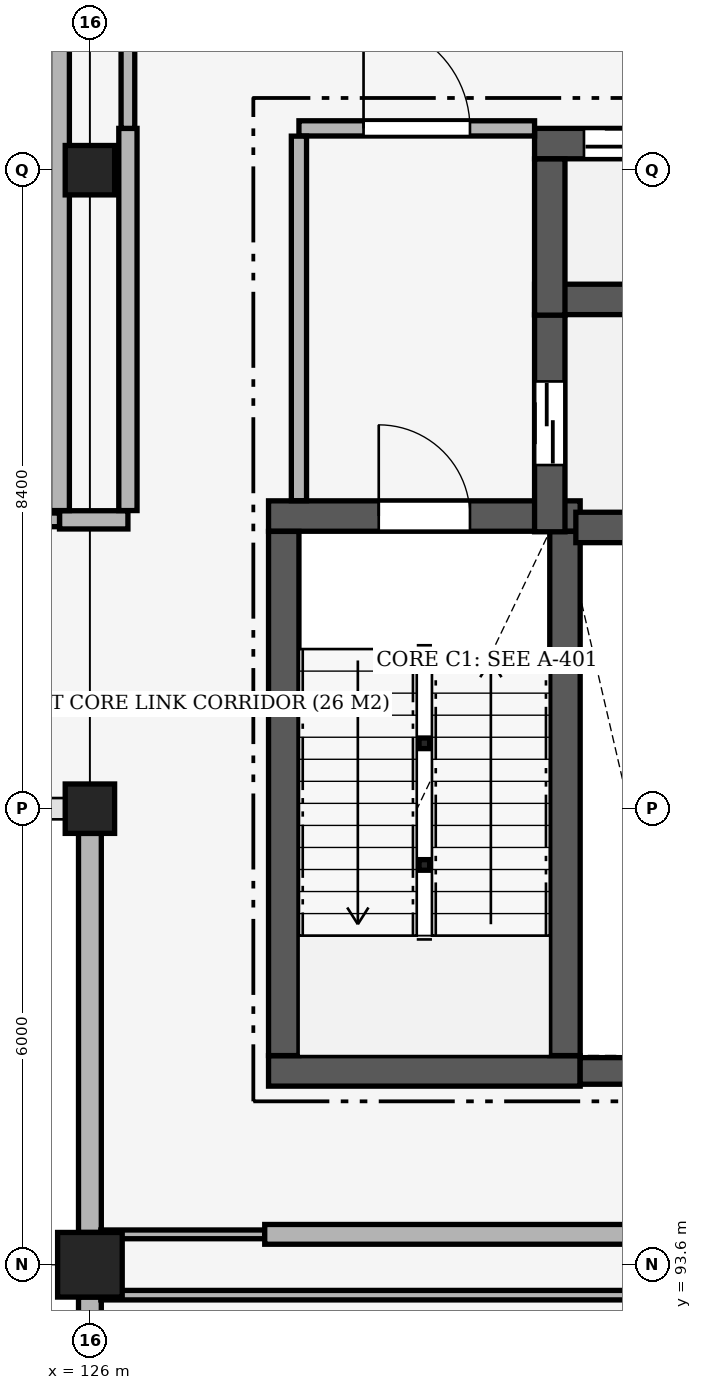
"""IFC4 building model, lengths in metres.
Left out: names, types, materials, properties, quantities, classifications, styles, units other than length and angle.
Written with IfcOpenShell. Run it as: python <this file> out.ifc"""

import sys

from ifc_helpers import new_model, si_unit, direction, frame, frame_2d, origin, origin_2d, place, context, subcontext, project, spatial, rectangle, hollow_circle, extrude, element, fill, save


model = new_model("IFC4")
c1 = context("Model", 3, precision=1e-05, world=origin(), true_north=direction((0.0, 1.0)))
c2 = subcontext(c1, "Body", "Model", "MODEL_VIEW")
j1 = project(units=[si_unit("LENGTHUNIT", "METRE"), si_unit("PLANEANGLEUNIT", "RADIAN")], contexts=[c1])
p1 = place(None, origin())
s1 = spatial("IfcSite", under=j1, at=p1, CompositionType="ELEMENT")
p2 = place(p1, origin())
s2 = spatial("IfcBuilding", under=s1, at=p2, CompositionType="ELEMENT")
p3 = place(p2, origin())
s3 = spatial("IfcBuildingStorey", under=s2, at=p3, CompositionType="ELEMENT", Elevation=0.0)
p4 = place(p3, frame((126.0, 93.6, 0.0), z_axis=(0.0, 0.0, 1.0), x_axis=(1.0, 0.0, 0.0)))
e1 = element("IfcColumn", 1, at=p4, inside=s3, PredefinedType="COLUMN", context=c2, shape_type="SweptSolid", body=[
    extrude(rectangle(XDim=0.85, YDim=0.85, at=origin_2d()), origin(), (0.0, 0.0, 1.0), 5.1),
])
for number, where, z_axis, x_axis in (
    (2, (126.0, 99.6, 0.0), (0.0, 0.0, 1.0), (1.0, 0.0, 0.0)),
    (3, (126.0, 108.0, 0.0), (0.0, 0.0, 1.0), (1.0, 0.0, 0.0)),
):
    element("IfcColumn", number, at=place(p3, frame(where, z_axis=z_axis, x_axis=x_axis)), inside=s3, PredefinedType="COLUMN", context=c2, shape_type="SweptSolid", body=[
        extrude(rectangle(XDim=0.65, YDim=0.65, at=origin_2d()), origin(), (0.0, 0.0, 1.0), 5.1),
    ])
for number, where, z_axis, x_axis in (
    (4, (130.4, 98.86, -2.83), (0.0, 0.0, 1.0), (1.0, 0.0, 0.0)),
    (5, (130.4, 100.46, -2.83), (0.0, 0.0, 1.0), (1.0, 0.0, 0.0)),
):
    element("IfcColumn", number, at=place(p3, frame(where, z_axis=z_axis, x_axis=x_axis)), inside=s3, PredefinedType="COLUMN", context=c2, shape_type="SweptSolid", body=[
        extrude(hollow_circle(Radius=0.07, WallThickness=0.008, at=origin_2d()), origin(), (0.0, 0.0, 1.0), 4.95),
    ])
p5 = place(p3, frame((126.0, 85.625, 0.0), z_axis=(0.0, 0.0, 1.0), x_axis=(0.0, 1.0, 0.0)))
e6 = element("IfcWall", 6, at=p5, inside=s3, PredefinedType="SOLIDWALL", context=c2, shape_type="SweptSolid", body=[
    extrude(rectangle(XDim=7.55, YDim=0.3, at=frame_2d((3.775, 0.0))), origin(), (0.0, 0.0, 1.0), 4.02),
])
p6 = place(p5, frame((1.717, 0.0, 0.85)))
e7 = element("IfcOpeningElement", 7, at=p6, cuts=e6, PredefinedType="OPENING", context=c2, shape_type="SweptSolid", body=[
    extrude(rectangle(XDim=1.2, YDim=2.4, at=frame_2d((0.6, 1.2))), frame((0.0, 0.165, 0.0), z_axis=(0.0, -1.0, 0.0), x_axis=(1.0, 0.0, 0.0)), (0.0, 0.0, 1.0), 0.33),
])
p7 = place(p5, frame((4.633, 0.0, 0.85)))
e8 = element("IfcOpeningElement", 8, at=p7, cuts=e6, PredefinedType="OPENING", context=c2, shape_type="SweptSolid", body=[
    extrude(rectangle(XDim=1.2, YDim=2.4, at=frame_2d((0.6, 1.2))), frame((0.0, 0.165, 0.0), z_axis=(0.0, -1.0, 0.0), x_axis=(1.0, 0.0, 0.0)), (0.0, 0.0, 1.0), 0.33),
])
p8 = place(p3, frame((126.0, 94.025, 0.0), z_axis=(0.0, 0.0, 1.0), x_axis=(0.0, 1.0, 0.0)))
e9 = element("IfcWall", 9, at=p8, inside=s3, PredefinedType="SOLIDWALL", context=c2, shape_type="SweptSolid", body=[
    extrude(rectangle(XDim=5.25, YDim=0.3, at=frame_2d((2.625, 0.0))), origin(), (0.0, 0.0, 1.0), 4.17),
])
p9 = place(p3, frame((128.35, 103.45, 0.0), z_axis=(0.0, 0.0, 1.0), x_axis=(1.0, 0.0, 0.0)))
e10 = element("IfcWall", 10, at=p9, inside=s3, PredefinedType="SHEAR", context=c2, shape_type="SweptSolid", body=[
    extrude(rectangle(XDim=4.1, YDim=0.4, at=frame_2d((2.05, 0.0))), origin(), (0.0, 0.0, 1.0), 4.82),
])
p10 = place(p9, frame((1.45, 0.0, 0.0)))
e11 = element("IfcOpeningElement", 11, at=p10, cuts=e10, PredefinedType="OPENING", context=c2, shape_type="SweptSolid", body=[
    extrude(rectangle(XDim=1.2, YDim=2.2, at=frame_2d((0.6, 1.1))), frame((0.0, 0.215, 0.0), z_axis=(0.0, -1.0, 0.0), x_axis=(1.0, 0.0, 0.0)), (0.0, 0.0, 1.0), 0.43),
])
p11 = place(p3, frame((128.35, 96.15, 0.0), z_axis=(0.0, 0.0, 1.0), x_axis=(1.0, 0.0, 0.0)))
e12 = element("IfcWall", 12, at=p11, inside=s3, PredefinedType="SHEAR", context=c2, shape_type="SweptSolid", body=[
    extrude(rectangle(XDim=4.1, YDim=0.4, at=frame_2d((2.05, 0.0))), origin(), (0.0, 0.0, 1.0), 4.82),
])
for number, where, z_axis, x_axis in (
    (13, (128.55, 96.352, 0.0), (0.0, 0.0, 1.0), (0.0, 1.0, 0.0)),
    (14, (132.25, 96.352, 0.0), (0.0, 0.0, 1.0), (0.0, 1.0, 0.0)),
):
    element("IfcWall", number, at=place(p3, frame(where, z_axis=z_axis, x_axis=x_axis)), inside=s3, PredefinedType="SHEAR", context=c2, shape_type="SweptSolid", body=[
        extrude(rectangle(XDim=6.896, YDim=0.4, at=frame_2d((3.448, 0.0))), origin(), (0.0, 0.0, 1.0), 4.82),
    ])
p12 = place(p3, frame((132.393, 103.3, 0.0), z_axis=(0.0, 0.0, 1.0), x_axis=(1.0, 0.0, 0.0)))
e15 = element("IfcWall", 15, at=p12, inside=s3, PredefinedType="SHEAR", context=c2, shape_type="SweptSolid", body=[
    extrude(rectangle(XDim=1.857, YDim=0.4, at=frame_2d((0.928, 0.0))), origin(), (0.0, 0.0, 1.0), 4.82),
])
p13 = place(p3, frame((131.85, 106.3, 0.0), z_axis=(0.0, 0.0, 1.0), x_axis=(1.0, 0.0, 0.0)))
e16 = element("IfcWall", 16, at=p13, inside=s3, PredefinedType="SHEAR", context=c2, shape_type="SweptSolid", body=[
    extrude(rectangle(XDim=2.4, YDim=0.4, at=frame_2d((1.2, 0.0))), origin(), (0.0, 0.0, 1.0), 4.82),
])
p14 = place(p3, frame((132.05, 103.243, 0.0), z_axis=(0.0, 0.0, 1.0), x_axis=(0.0, 1.0, 0.0)))
e17 = element("IfcWall", 17, at=p14, inside=s3, PredefinedType="SHEAR", context=c2, shape_type="SweptSolid", body=[
    extrude(rectangle(XDim=2.855, YDim=0.4, at=frame_2d((1.427, 0.0))), origin(), (0.0, 0.0, 1.0), 4.82),
])
p15 = place(p14, frame((0.878, 0.0, 0.0)))
e18 = element("IfcOpeningElement", 18, at=p15, cuts=e17, PredefinedType="OPENING", context=c2, shape_type="SweptSolid", body=[
    extrude(rectangle(XDim=1.1, YDim=2.15, at=frame_2d((0.55, 1.075))), frame((0.0, 0.215, 0.0), z_axis=(0.0, -1.0, 0.0), x_axis=(1.0, 0.0, 0.0)), (0.0, 0.0, 1.0), 0.43),
])
p16 = place(p3, frame((131.85, 108.35, 0.0), z_axis=(0.0, 0.0, 1.0), x_axis=(1.0, 0.0, 0.0)))
e19 = element("IfcWall", 19, at=p16, inside=s3, PredefinedType="SHEAR", context=c2, shape_type="SweptSolid", body=[
    extrude(rectangle(XDim=2.4, YDim=0.4, at=frame_2d((1.2, 0.0))), origin(), (0.0, 0.0, 1.0), 4.82),
])
p17 = place(p16, frame((0.65, 0.0, 0.0)))
e20 = element("IfcOpeningElement", 20, at=p17, cuts=e19, PredefinedType="OPENING", context=c2, shape_type="SweptSolid", body=[
    extrude(rectangle(XDim=1.1, YDim=2.15, at=frame_2d((0.55, 1.075))), frame((0.0, 0.215, 0.0), z_axis=(0.0, -1.0, 0.0), x_axis=(1.0, 0.0, 0.0)), (0.0, 0.0, 1.0), 0.43),
])
p18 = place(p3, frame((132.05, 106.093, 0.0), z_axis=(0.0, 0.0, 1.0), x_axis=(0.0, 1.0, 0.0)))
e21 = element("IfcWall", 21, at=p18, inside=s3, PredefinedType="SHEAR", context=c2, shape_type="SweptSolid", body=[
    extrude(rectangle(XDim=2.055, YDim=0.4, at=frame_2d((1.027, 0.0))), origin(), (0.0, 0.0, 1.0), 4.82),
])
p19 = place(p3, frame((132.45, 96.15, 0.0), z_axis=(0.0, 0.0, 1.0), x_axis=(1.0, 0.0, 0.0)))
e22 = element("IfcWall", 22, at=p19, inside=s3, PredefinedType="SHEAR", context=c2, shape_type="SweptSolid", body=[
    extrude(rectangle(XDim=1.8, YDim=0.35, at=frame_2d((0.9, 0.0))), origin(), (0.0, 0.0, 1.0), 4.82),
])
p20 = place(p3, frame((126.144, 93.2, 0.0), z_axis=(0.0, 0.0, 1.0), x_axis=(1.0, 0.0, 0.0)))
e23 = element("IfcWall", 23, at=p20, inside=s3, PredefinedType="PARTITIONING", context=c2, shape_type="SweptSolid", body=[
    extrude(rectangle(XDim=12.656, YDim=0.125, at=frame_2d((6.328, 0.0))), origin(), (0.0, 0.0, 1.0), 4.02),
])
p21 = place(p3, frame((126.144, 94.0, 0.0), z_axis=(0.0, 0.0, 1.0), x_axis=(1.0, 0.0, 0.0)))
e24 = element("IfcWall", 24, at=p21, inside=s3, PredefinedType="PARTITIONING", context=c2, shape_type="SweptSolid", body=[
    extrude(rectangle(XDim=2.156, YDim=0.115, at=frame_2d((1.078, 0.0))), origin(), (0.0, 0.0, 1.0), 4.17),
])
p22 = place(p3, frame((128.3, 94.0, 0.0), z_axis=(0.0, 0.0, 1.0), x_axis=(1.0, 0.0, 0.0)))
e25 = element("IfcWall", 25, at=p22, inside=s3, PredefinedType="PARTITIONING", context=c2, shape_type="SweptSolid", body=[
    extrude(rectangle(XDim=10.5, YDim=0.26, at=frame_2d((5.25, 0.0))), origin(), (0.0, 0.0, 1.0), 4.17),
])
p23 = place(p3, frame((125.6, 103.4, 0.0), z_axis=(0.0, 0.0, 1.0), x_axis=(1.0, 0.0, 0.0)))
e26 = element("IfcWall", 26, at=p23, inside=s3, PredefinedType="PARTITIONING", context=c2, shape_type="SweptSolid", body=[
    extrude(rectangle(XDim=0.9, YDim=0.24, at=frame_2d((0.45, 0.0))), origin(), (0.0, 0.0, 1.0), 4.02),
])
p24 = place(p3, frame((100.8, 103.4, 0.0), z_axis=(0.0, 0.0, 1.0), x_axis=(1.0, 0.0, 0.0)))
e27 = element("IfcWall", 27, at=p24, inside=s3, PredefinedType="PARTITIONING", context=c2, shape_type="SweptSolid", body=[
    extrude(rectangle(XDim=24.8, YDim=0.18, at=frame_2d((12.4, 0.0))), origin(), (0.0, 0.0, 1.0), 4.02),
])
p25 = place(p24, frame((11.775, 0.0, 0.0)))
e28 = element("IfcOpeningElement", 28, at=p25, cuts=e27, PredefinedType="OPENING", context=c2, shape_type="SweptSolid", body=[
    extrude(rectangle(XDim=1.25, YDim=2.2, at=frame_2d((0.625, 1.1))), frame((0.0, 0.105, 0.0), z_axis=(0.0, -1.0, 0.0), x_axis=(1.0, 0.0, 0.0)), (0.0, 0.0, 1.0), 0.21),
])
p26 = place(p3, frame((128.75, 108.55, 0.0), z_axis=(0.0, 0.0, 1.0), x_axis=(1.0, 0.0, 0.0)))
e29 = element("IfcWall", 29, at=p26, inside=s3, PredefinedType="PARTITIONING", context=c2, shape_type="SweptSolid", body=[
    extrude(rectangle(XDim=3.1, YDim=0.2, at=frame_2d((1.55, 0.0))), origin(), (0.0, 0.0, 1.0), 4.82),
])
p27 = place(p26, frame((0.85, 0.0, 0.0)))
e30 = element("IfcOpeningElement", 30, at=p27, cuts=e29, PredefinedType="OPENING", context=c2, shape_type="SweptSolid", body=[
    extrude(rectangle(XDim=1.4, YDim=2.2, at=frame_2d((0.7, 1.1))), frame((0.0, 0.115, 0.0), z_axis=(0.0, -1.0, 0.0), x_axis=(1.0, 0.0, 0.0)), (0.0, 0.0, 1.0), 0.23),
])
p28 = place(p3, frame((125.6, 103.522, 0.0), z_axis=(0.0, 0.0, 1.0), x_axis=(0.0, 1.0, 0.0)))
e31 = element("IfcWall", 31, at=p28, inside=s3, PredefinedType="PARTITIONING", context=c2, shape_type="SweptSolid", body=[
    extrude(rectangle(XDim=9.726, YDim=0.26, at=frame_2d((4.863, 0.0))), origin(), (0.0, 0.0, 1.0), 4.12),
])
p29 = place(p3, frame((126.5, 103.522, 0.0), z_axis=(0.0, 0.0, 1.0), x_axis=(0.0, 1.0, 0.0)))
e32 = element("IfcWall", 32, at=p29, inside=s3, PredefinedType="PARTITIONING", context=c2, shape_type="SweptSolid", body=[
    extrude(rectangle(XDim=5.028, YDim=0.24, at=frame_2d((2.514, 0.0))), origin(), (0.0, 0.0, 1.0), 4.82),
])
p30 = place(p3, frame((126.5, 108.55, 0.0), z_axis=(0.0, 0.0, 1.0), x_axis=(0.0, 1.0, 0.0)))
e33 = element("IfcWall", 33, at=p30, inside=s3, PredefinedType="PARTITIONING", context=c2, shape_type="SweptSolid", body=[
    extrude(rectangle(XDim=3.818, YDim=0.18, at=frame_2d((1.909, 0.0))), origin(), (0.0, 0.0, 1.0), 4.82),
])
p31 = place(p3, frame((128.75, 103.652, 0.0), z_axis=(0.0, 0.0, 1.0), x_axis=(0.0, 1.0, 0.0)))
e34 = element("IfcWall", 34, at=p31, inside=s3, PredefinedType="PARTITIONING", context=c2, shape_type="SweptSolid", body=[
    extrude(rectangle(XDim=4.796, YDim=0.2, at=frame_2d((2.398, 0.0))), origin(), (0.0, 0.0, 1.0), 4.82),
])
p32 = place(p10, origin())
e35 = element("IfcDoor", 35, at=p32, inside=s3, OperationType="SINGLE_SWING_LEFT", PredefinedType="DOOR", context=c2, shape_type="SweptSolid", body=[
    extrude(rectangle(XDim=1.2, YDim=2.2, at=frame_2d((0.6, 1.1))), frame((0.0, 0.025, 0.0), z_axis=(0.0, -1.0, 0.0), x_axis=(1.0, 0.0, 0.0)), (0.0, 0.0, 1.0), 0.05),
])
fill(e11, e35)
p33 = place(p15, origin())
e36 = element("IfcDoor", 36, at=p33, inside=s3, OperationType="DOUBLE_DOOR_SLIDING", PredefinedType="DOOR", context=c2, shape_type="SweptSolid", body=[
    extrude(rectangle(XDim=1.1, YDim=2.15, at=frame_2d((0.55, 1.075))), frame((0.0, 0.025, 0.0), z_axis=(0.0, -1.0, 0.0), x_axis=(1.0, 0.0, 0.0)), (0.0, 0.0, 1.0), 0.05),
])
fill(e18, e36)
p34 = place(p17, origin())
e37 = element("IfcDoor", 37, at=p34, inside=s3, OperationType="DOUBLE_DOOR_SLIDING", PredefinedType="DOOR", context=c2, shape_type="SweptSolid", body=[
    extrude(rectangle(XDim=1.1, YDim=2.15, at=frame_2d((0.55, 1.075))), frame((0.0, 0.025, 0.0), z_axis=(0.0, -1.0, 0.0), x_axis=(1.0, 0.0, 0.0)), (0.0, 0.0, 1.0), 0.05),
])
fill(e20, e37)
p35 = place(p27, origin())
e38 = element("IfcDoor", 38, at=p35, inside=s3, OperationType="SINGLE_SWING_LEFT", PredefinedType="DOOR", context=c2, shape_type="SweptSolid", body=[
    extrude(rectangle(XDim=1.4, YDim=2.2, at=frame_2d((0.7, 1.1))), frame((0.0, 0.025, 0.0), z_axis=(0.0, -1.0, 0.0), x_axis=(1.0, 0.0, 0.0)), (0.0, 0.0, 1.0), 0.05),
])
fill(e30, e38)
save(model, sys.argv[1])
